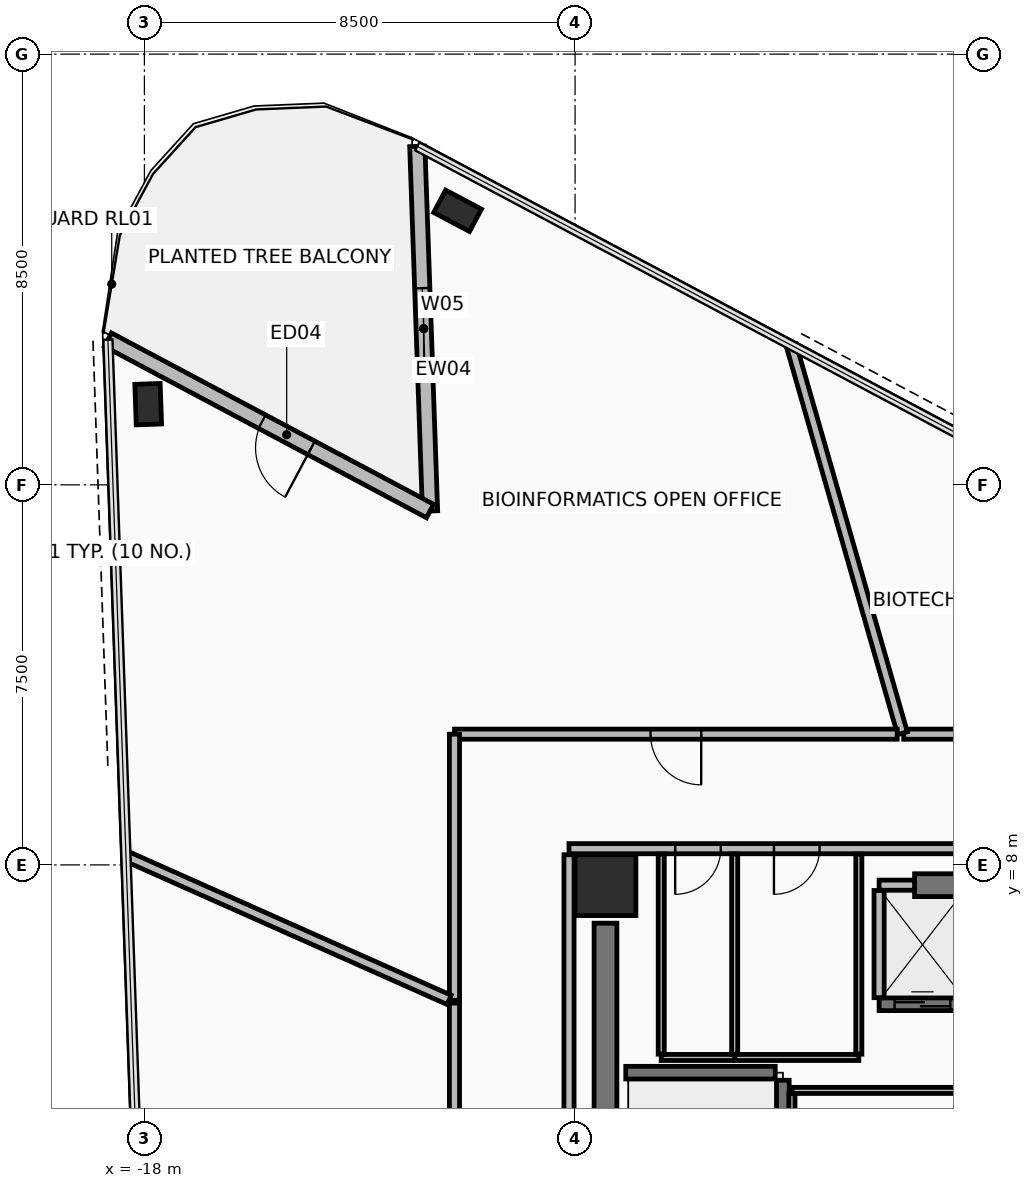
"""IFC4 building model, lengths in metres.
Left out: names, types, materials, properties, quantities, classifications, styles, units other than length and angle.
Written with IfcOpenShell. Run it as: python <this file> out.ifc"""

import sys

from ifc_helpers import new_model, si_unit, direction, frame, frame_2d, origin, origin_2d, place, context, subcontext, project, spatial, rectangle, hollow_rectangle, extrude, element, fill, save


model = new_model("IFC4")
c1 = context("Model", 3, precision=1e-05, world=origin(), true_north=direction((0.0, 1.0)))
c2 = subcontext(c1, "Body", "Model", "MODEL_VIEW")
j1 = project(units=[si_unit("LENGTHUNIT", "METRE"), si_unit("PLANEANGLEUNIT", "RADIAN")], contexts=[c1])
p1 = place(None, origin())
s1 = spatial("IfcSite", under=j1, at=p1, CompositionType="ELEMENT")
p2 = place(p1, origin())
s2 = spatial("IfcBuilding", under=s1, at=p2, CompositionType="ELEMENT")
p3 = place(p2, frame((0.0, 0.0, 156.8)))
s3 = spatial("IfcBuildingStorey", under=s2, at=p3, CompositionType="ELEMENT", Elevation=156.8)
p4 = place(p3, frame((-8.9, 7.6, 0.0), z_axis=(0.0, 0.0, 1.0), x_axis=(1.0, 0.0, 0.0)))
e1 = element("IfcColumn", 1, at=p4, inside=s3, PredefinedType="COLUMN", context=c2, shape_type="SweptSolid", body=[
    extrude(rectangle(XDim=1.2, YDim=1.2, at=origin_2d()), origin(), (0.0, 0.0, 1.0), 3.6),
])
for number, where, z_axis, x_axis in (
    (2, (-17.925, 17.092, 0.0), (0.0, 0.0, 1.0), (-0.035, 0.999, 0.0)),
    (3, (-11.819, 20.908, 0.0), (0.0, 0.0, 1.0), (-0.883, 0.469, 0.0)),
):
    element("IfcColumn", number, at=place(p3, frame(where, z_axis=z_axis, x_axis=x_axis)), inside=s3, PredefinedType="COLUMN", context=c2, shape_type="SweptSolid", body=[
        extrude(hollow_rectangle(XDim=0.5, YDim=0.8, WallThickness=0.04, at=origin_2d()), origin(), (0.0, 0.0, 1.0), 3.6),
    ])
p5 = place(p3, frame((-12.614, 22.18, 0.0), z_axis=(0.0, 0.0, 1.0), x_axis=(0.034925918675, -0.999389903994, 0.0)))
e4 = element("IfcWall", 4, at=p5, inside=s3, PredefinedType="STANDARD", context=c2, shape_type="SweptSolid", body=[
    extrude(rectangle(XDim=7.2, YDim=0.3, at=frame_2d((3.6, 0.0))), origin(), (0.0, 0.0, 1.0), 2.705),
])
p6 = place(p5, frame((2.8, 0.0, 0.325)))
e5 = element("IfcOpeningElement", 5, at=p6, cuts=e4, PredefinedType="OPENING", context=c2, shape_type="SweptSolid", body=[
    extrude(rectangle(XDim=1.6, YDim=2.2, at=frame_2d((0.8, 1.1))), frame((0.0, 0.16, 0.0), z_axis=(0.0, -1.0, 0.0), x_axis=(1.0, 0.0, 0.0)), (0.0, 0.0, 1.0), 0.32),
])
p7 = place(p3, frame((-12.363, 14.984, 0.0), z_axis=(0.0, 0.0, 1.0), x_axis=(-0.882950149473, 0.469466754463, 0.0)))
e6 = element("IfcWall", 6, at=p7, inside=s3, PredefinedType="STANDARD", context=c2, shape_type="SweptSolid", body=[
    extrude(rectangle(XDim=7.2, YDim=0.3, at=frame_2d((3.6, 0.0))), origin(), (0.0, 0.0, 1.0), 2.705),
])
p8 = place(p7, frame((2.654, 0.0, 0.0)))
e7 = element("IfcOpeningElement", 7, at=p8, cuts=e6, PredefinedType="OPENING", context=c2, shape_type="SweptSolid", body=[
    extrude(rectangle(XDim=1.1, YDim=2.2, at=frame_2d((0.55, 1.1))), frame((0.0, 0.16, 0.0), z_axis=(0.0, -1.0, 0.0), x_axis=(1.0, 0.0, 0.0)), (0.0, 0.0, 1.0), 0.32),
])
p9 = place(p3, frame((-2.8, 7.6, 0.0), z_axis=(0.0, 0.0, 1.0), x_axis=(1.0, 0.0, 0.0)))
e8 = element("IfcWall", 8, at=p9, inside=s3, PredefinedType="SHEAR", context=c2, shape_type="SweptSolid", body=[
    extrude(rectangle(XDim=5.38, YDim=0.45, at=frame_2d((2.69, 0.0))), origin(), (0.0, 0.0, 1.0), 3.41),
])
p10 = place(p3, frame((-8.9, -3.85, 0.0), z_axis=(0.0, 0.0, 1.0), x_axis=(0.0, 1.0, 0.0)))
e9 = element("IfcWall", 9, at=p10, inside=s3, PredefinedType="SHEAR", context=c2, shape_type="SweptSolid", body=[
    extrude(rectangle(XDim=10.7, YDim=0.45, at=frame_2d((5.35, 0.0))), origin(), (0.0, 0.0, 1.0), 3.41),
])
p11 = place(p3, frame((9.62, 8.32, 0.0), z_axis=(0.0, 0.0, 1.0), x_axis=(-1.0, 0.0, 0.0)))
e10 = element("IfcWall", 10, at=p11, inside=s3, PredefinedType="PARTITIONING", context=c2, shape_type="SweptSolid", body=[
    extrude(rectangle(XDim=19.24, YDim=0.2, at=frame_2d((9.62, 0.0))), origin(), (0.0, 0.0, 1.0), 2.755),
])
p12 = place(p11, frame((16.245, 0.0, 0.0)))
e11 = element("IfcOpeningElement", 11, at=p12, cuts=e10, PredefinedType="OPENING", context=c2, shape_type="SweptSolid", body=[
    extrude(rectangle(XDim=0.9, YDim=2.1, at=frame_2d((0.45, 1.05))), frame((0.0, 0.11, 0.0), z_axis=(0.0, -1.0, 0.0), x_axis=(1.0, 0.0, 0.0)), (0.0, 0.0, 1.0), 0.22),
])
p13 = place(p11, frame((14.295, 0.0, 0.0)))
e12 = element("IfcOpeningElement", 12, at=p13, cuts=e10, PredefinedType="OPENING", context=c2, shape_type="SweptSolid", body=[
    extrude(rectangle(XDim=0.9, YDim=2.1, at=frame_2d((0.45, 1.05))), frame((0.0, 0.11, 0.0), z_axis=(0.0, -1.0, 0.0), x_axis=(1.0, 0.0, 0.0)), (0.0, 0.0, 1.0), 0.22),
])
p14 = place(p3, frame((-9.62, 8.2, 0.0), z_axis=(0.0, 0.0, 1.0), x_axis=(0.0, -1.0, 0.0)))
e13 = element("IfcWall", 13, at=p14, inside=s3, PredefinedType="PARTITIONING", context=c2, shape_type="SweptSolid", body=[
    extrude(rectangle(XDim=16.4, YDim=0.2, at=frame_2d((8.2, 0.0))), origin(), (0.0, 0.0, 1.0), 2.855),
])
p15 = place(p14, frame((12.65, 0.0, 0.0)))
e14 = element("IfcOpeningElement", 14, at=p15, cuts=e13, PredefinedType="OPENING", context=c2, shape_type="SweptSolid", body=[
    extrude(rectangle(XDim=1.1, YDim=2.15, at=frame_2d((0.55, 1.075))), frame((0.0, 0.11, 0.0), z_axis=(0.0, -1.0, 0.0), x_axis=(1.0, 0.0, 0.0)), (0.0, 0.0, 1.0), 0.22),
])
p16 = place(p3, frame((-5.4, -3.55, 0.0), z_axis=(0.0, 0.0, 1.0), x_axis=(0.0, 1.0, 0.0)))
e15 = element("IfcWall", 15, at=p16, inside=s3, PredefinedType="SHEAR", context=c2, shape_type="SweptSolid", body=[
    extrude(rectangle(XDim=7.3, YDim=0.25, at=frame_2d((3.65, 0.0))), origin(), (0.0, 0.0, 1.0), 3.41),
])
p17 = place(p3, frame((-8.5, 3.9, 0.0), z_axis=(0.0, 0.0, 1.0), x_axis=(1.0, 0.0, 0.0)))
e16 = element("IfcWall", 16, at=p17, inside=s3, PredefinedType="SHEAR", context=c2, shape_type="SweptSolid", body=[
    extrude(rectangle(XDim=2.95, YDim=0.25, at=frame_2d((1.475, 0.0))), origin(), (0.0, 0.0, 1.0), 3.41),
])
p18 = place(p3, frame((-3.5, 5.25, 0.0), z_axis=(0.0, 0.0, 1.0), x_axis=(1.0, 0.0, 0.0)))
e17 = element("IfcWall", 17, at=p18, inside=s3, PredefinedType="SHEAR", context=c2, shape_type="SweptSolid", body=[
    extrude(rectangle(XDim=1.712, YDim=0.25, at=frame_2d((0.856, 0.0))), origin(), (0.0, 0.0, 1.0), 3.41),
])
p19 = place(p18, frame((0.306, 0.0, 0.0)))
e18 = element("IfcOpeningElement", 18, at=p19, cuts=e17, PredefinedType="OPENING", context=c2, shape_type="SweptSolid", body=[
    extrude(rectangle(XDim=1.1, YDim=2.2, at=frame_2d((0.55, 1.1))), frame((0.0, 0.135, 0.0), z_axis=(0.0, -1.0, 0.0), x_axis=(1.0, 0.0, 0.0)), (0.0, 0.0, 1.0), 0.27),
])
p20 = place(p3, frame((-3.5, 7.6, 0.0), z_axis=(0.0, 0.0, 1.0), x_axis=(1.0, 0.0, 0.0)))
e19 = element("IfcWall", 19, at=p20, inside=s3, PredefinedType="PARTITIONING", context=c2, shape_type="SweptSolid", body=[
    extrude(rectangle(XDim=0.7, YDim=0.2, at=frame_2d((0.35, 0.0))), origin(), (0.0, 0.0, 1.0), 2.605),
])
p21 = place(p3, frame((-3.5, 5.38, 0.0), z_axis=(0.0, 0.0, 1.0), x_axis=(0.0, 1.0, 0.0)))
e20 = element("IfcWall", 20, at=p21, inside=s3, PredefinedType="PARTITIONING", context=c2, shape_type="SweptSolid", body=[
    extrude(rectangle(XDim=2.115, YDim=0.2, at=frame_2d((1.058, 0.0))), origin(), (0.0, 0.0, 1.0), 2.605),
])
p22 = place(p3, frame((-1.815, 3.55, 0.0), z_axis=(0.0, 0.0, 1.0), x_axis=(-1.0, 0.0, 0.0)))
e21 = element("IfcWall", 21, at=p22, inside=s3, PredefinedType="PARTITIONING", context=c2, shape_type="SweptSolid", body=[
    extrude(rectangle(XDim=3.405, YDim=0.12, at=frame_2d((1.703, 0.0))), origin(), (0.0, 0.0, 1.0), 3.41),
])
p23 = place(p3, frame((-5.22, 3.485, 0.0), z_axis=(0.0, 0.0, 1.0), x_axis=(0.0, -1.0, 0.0)))
e22 = element("IfcWall", 22, at=p23, inside=s3, PredefinedType="PARTITIONING", context=c2, shape_type="SweptSolid", body=[
    extrude(rectangle(XDim=1.9, YDim=0.12, at=frame_2d((0.95, 0.0))), origin(), (0.0, 0.0, 1.0), 3.41),
])
p24 = place(p3, frame((-7.8, 4.2, 0.0), z_axis=(0.0, 0.0, 1.0), x_axis=(1.0, 0.0, 0.0)))
e23 = element("IfcWall", 23, at=p24, inside=s3, PredefinedType="PARTITIONING", context=c2, shape_type="SweptSolid", body=[
    extrude(rectangle(XDim=1.45, YDim=0.12, at=frame_2d((0.725, 0.0))), origin(), (0.0, 0.0, 1.0), 3.41),
])
for number, where, z_axis, x_axis in (
    (24, (-6.35, 4.265, 0.0), (0.0, 0.0, 1.0), (0.0, 1.0, 0.0)),
    (25, (-7.8, 8.215, 0.0), (0.0, 0.0, 1.0), (0.0, -1.0, 0.0)),
):
    element("IfcWall", number, at=place(p3, frame(where, z_axis=z_axis, x_axis=x_axis)), inside=s3, PredefinedType="PARTITIONING", context=c2, shape_type="SweptSolid", body=[
        extrude(rectangle(XDim=3.95, YDim=0.12, at=frame_2d((1.975, 0.0))), origin(), (0.0, 0.0, 1.0), 2.605),
    ])
p25 = place(p3, frame((-6.35, 4.2, 0.0), z_axis=(0.0, 0.0, 1.0), x_axis=(1.0, 0.0, 0.0)))
e26 = element("IfcWall", 26, at=p25, inside=s3, PredefinedType="PARTITIONING", context=c2, shape_type="SweptSolid", body=[
    extrude(rectangle(XDim=2.45, YDim=0.12, at=frame_2d((1.225, 0.0))), origin(), (0.0, 0.0, 1.0), 3.41),
])
p26 = place(p3, frame((-3.9, 4.265, 0.0), z_axis=(0.0, 0.0, 1.0), x_axis=(0.0, 1.0, 0.0)))
e27 = element("IfcWall", 27, at=p26, inside=s3, PredefinedType="PARTITIONING", context=c2, shape_type="SweptSolid", body=[
    extrude(rectangle(XDim=3.95, YDim=0.12, at=frame_2d((1.975, 0.0))), origin(), (0.0, 0.0, 1.0), 2.605),
])
p27 = place(p3, frame((7.674, 10.58, 0.0), z_axis=(0.0, 0.0, 1.0), x_axis=(-1.0, 0.0, 0.0)))
e28 = element("IfcWall", 28, at=p27, inside=s3, PredefinedType="PARTITIONING", context=c2, shape_type="SweptSolid", body=[
    extrude(rectangle(XDim=10.689, YDim=0.2, at=frame_2d((5.344, 0.0))), origin(), (0.0, 0.0, 1.0), 2.705),
])
p28 = place(p27, frame((4.845, 0.0, 0.0)))
e29 = element("IfcOpeningElement", 29, at=p28, cuts=e28, PredefinedType="OPENING", context=c2, shape_type="SweptSolid", body=[
    extrude(rectangle(XDim=1.0, YDim=2.15, at=frame_2d((0.5, 1.075))), frame((0.0, 0.11, 0.0), z_axis=(0.0, -1.0, 0.0), x_axis=(1.0, 0.0, 0.0)), (0.0, 0.0, 1.0), 0.22),
])
p29 = place(p3, frame((-3.039, 10.598, 0.0), z_axis=(0.0, 0.0, 1.0), x_axis=(-0.275619537282, 0.961266805142, 0.0)))
e30 = element("IfcWall", 30, at=p29, inside=s3, PredefinedType="PARTITIONING", context=c2, shape_type="SweptSolid", body=[
    extrude(rectangle(XDim=7.967, YDim=0.2, at=frame_2d((3.983, 0.0))), origin(), (0.0, 0.0, 1.0), 2.705),
])
p30 = place(p3, frame((-3.143, 10.58, 0.0), z_axis=(0.0, 0.0, 1.0), x_axis=(-1.0, 0.0, 0.0)))
e31 = element("IfcWall", 31, at=p30, inside=s3, PredefinedType="PARTITIONING", context=c2, shape_type="SweptSolid", body=[
    extrude(rectangle(XDim=8.736, YDim=0.2, at=frame_2d((4.368, 0.0))), origin(), (0.0, 0.0, 1.0), 2.755),
])
p31 = place(p30, frame((3.868, 0.0, 0.0)))
e32 = element("IfcOpeningElement", 32, at=p31, cuts=e31, PredefinedType="OPENING", context=c2, shape_type="SweptSolid", body=[
    extrude(rectangle(XDim=1.0, YDim=2.15, at=frame_2d((0.5, 1.075))), frame((0.0, 0.11, 0.0), z_axis=(0.0, -1.0, 0.0), x_axis=(1.0, 0.0, 0.0)), (0.0, 0.0, 1.0), 0.22),
])
p32 = place(p3, frame((-11.88, 10.579, 0.0), z_axis=(0.0, 0.0, 1.0), x_axis=(0.0, -1.0, 0.0)))
e33 = element("IfcWall", 33, at=p32, inside=s3, PredefinedType="PARTITIONING", context=c2, shape_type="SweptSolid", body=[
    extrude(rectangle(XDim=5.251, YDim=0.2, at=frame_2d((2.626, 0.0))), origin(), (0.0, 0.0, 1.0), 2.855),
])
p33 = place(p3, frame((-11.985, 5.336, 0.0), z_axis=(0.0, 0.0, 1.0), x_axis=(-0.913541116326, 0.406746393693, 0.0)))
e34 = element("IfcWall", 34, at=p33, inside=s3, PredefinedType="PARTITIONING", context=c2, shape_type="SweptSolid", body=[
    extrude(rectangle(XDim=6.967, YDim=0.2, at=frame_2d((3.483, 0.0))), origin(), (0.0, 0.0, 1.0), 2.705),
])
p34 = place(p3, frame((-11.88, 5.273, 0.0), z_axis=(0.0, 0.0, 1.0), x_axis=(0.0, -1.0, 0.0)))
e35 = element("IfcWall", 35, at=p34, inside=s3, PredefinedType="PARTITIONING", context=c2, shape_type="SweptSolid", body=[
    extrude(rectangle(XDim=11.052, YDim=0.2, at=frame_2d((5.526, 0.0))), origin(), (0.0, 0.0, 1.0), 2.855),
])
p35 = place(p34, frame((4.926, 0.0, 0.0)))
e36 = element("IfcOpeningElement", 36, at=p35, cuts=e35, PredefinedType="OPENING", context=c2, shape_type="SweptSolid", body=[
    extrude(rectangle(XDim=1.2, YDim=2.15, at=frame_2d((0.6, 1.075))), frame((0.0, 0.11, 0.0), z_axis=(0.0, -1.0, 0.0), x_axis=(1.0, 0.0, 0.0)), (0.0, 0.0, 1.0), 0.22),
])
p36 = place(p8, origin())
e37 = element("IfcDoor", 37, at=p36, inside=s3, OperationType="SINGLE_SWING_LEFT", PredefinedType="DOOR", context=c2, shape_type="SweptSolid", body=[
    extrude(rectangle(XDim=1.1, YDim=2.2, at=frame_2d((0.55, 1.1))), frame((0.0, 0.025, 0.0), z_axis=(0.0, -1.0, 0.0), x_axis=(1.0, 0.0, 0.0)), (0.0, 0.0, 1.0), 0.05),
])
fill(e7, e37)
p37 = place(p6, origin())
e38 = element("IfcWindow", 38, at=p37, inside=s3, PartitioningType="SINGLE_PANEL", PredefinedType="WINDOW", context=c2, shape_type="SweptSolid", body=[
    extrude(rectangle(XDim=1.6, YDim=2.2, at=frame_2d((0.8, 1.1))), frame((0.0, 0.03, 0.0), z_axis=(0.0, -1.0, 0.0), x_axis=(1.0, 0.0, 0.0)), (0.0, 0.0, 1.0), 0.06),
])
fill(e5, e38)
p38 = place(p19, origin())
e39 = element("IfcDoor", 39, at=p38, inside=s3, OperationType="SLIDING_TO_LEFT", PredefinedType="DOOR", context=c2, shape_type="SweptSolid", body=[
    extrude(rectangle(XDim=1.1, YDim=2.2, at=frame_2d((0.55, 1.1))), frame((0.0, 0.025, 0.0), z_axis=(0.0, -1.0, 0.0), x_axis=(1.0, 0.0, 0.0)), (0.0, 0.0, 1.0), 0.05),
])
fill(e18, e39)
p39 = place(p12, frame((0.9, 0.0, 0.0), z_axis=(0.0, 0.0, 1.0), x_axis=(-1.0, 0.0, 0.0)))
e40 = element("IfcDoor", 40, at=p39, inside=s3, OperationType="SINGLE_SWING_LEFT", PredefinedType="DOOR", context=c2, shape_type="SweptSolid", body=[
    extrude(rectangle(XDim=0.9, YDim=2.1, at=frame_2d((0.45, 1.05))), frame((0.0, 0.025, 0.0), z_axis=(0.0, -1.0, 0.0), x_axis=(1.0, 0.0, 0.0)), (0.0, 0.0, 1.0), 0.05),
])
fill(e11, e40)
p40 = place(p13, frame((0.9, 0.0, 0.0), z_axis=(0.0, 0.0, 1.0), x_axis=(-1.0, 0.0, 0.0)))
e41 = element("IfcDoor", 41, at=p40, inside=s3, OperationType="SINGLE_SWING_LEFT", PredefinedType="DOOR", context=c2, shape_type="SweptSolid", body=[
    extrude(rectangle(XDim=0.9, YDim=2.1, at=frame_2d((0.45, 1.05))), frame((0.0, 0.025, 0.0), z_axis=(0.0, -1.0, 0.0), x_axis=(1.0, 0.0, 0.0)), (0.0, 0.0, 1.0), 0.05),
])
fill(e12, e41)
p41 = place(p31, origin())
e42 = element("IfcDoor", 42, at=p41, inside=s3, OperationType="SINGLE_SWING_RIGHT", PredefinedType="DOOR", context=c2, shape_type="SweptSolid", body=[
    extrude(rectangle(XDim=1.0, YDim=2.15, at=frame_2d((0.5, 1.075))), frame((0.0, 0.025, 0.0), z_axis=(0.0, -1.0, 0.0), x_axis=(1.0, 0.0, 0.0)), (0.0, 0.0, 1.0), 0.05),
])
fill(e32, e42)
save(model, sys.argv[1])
